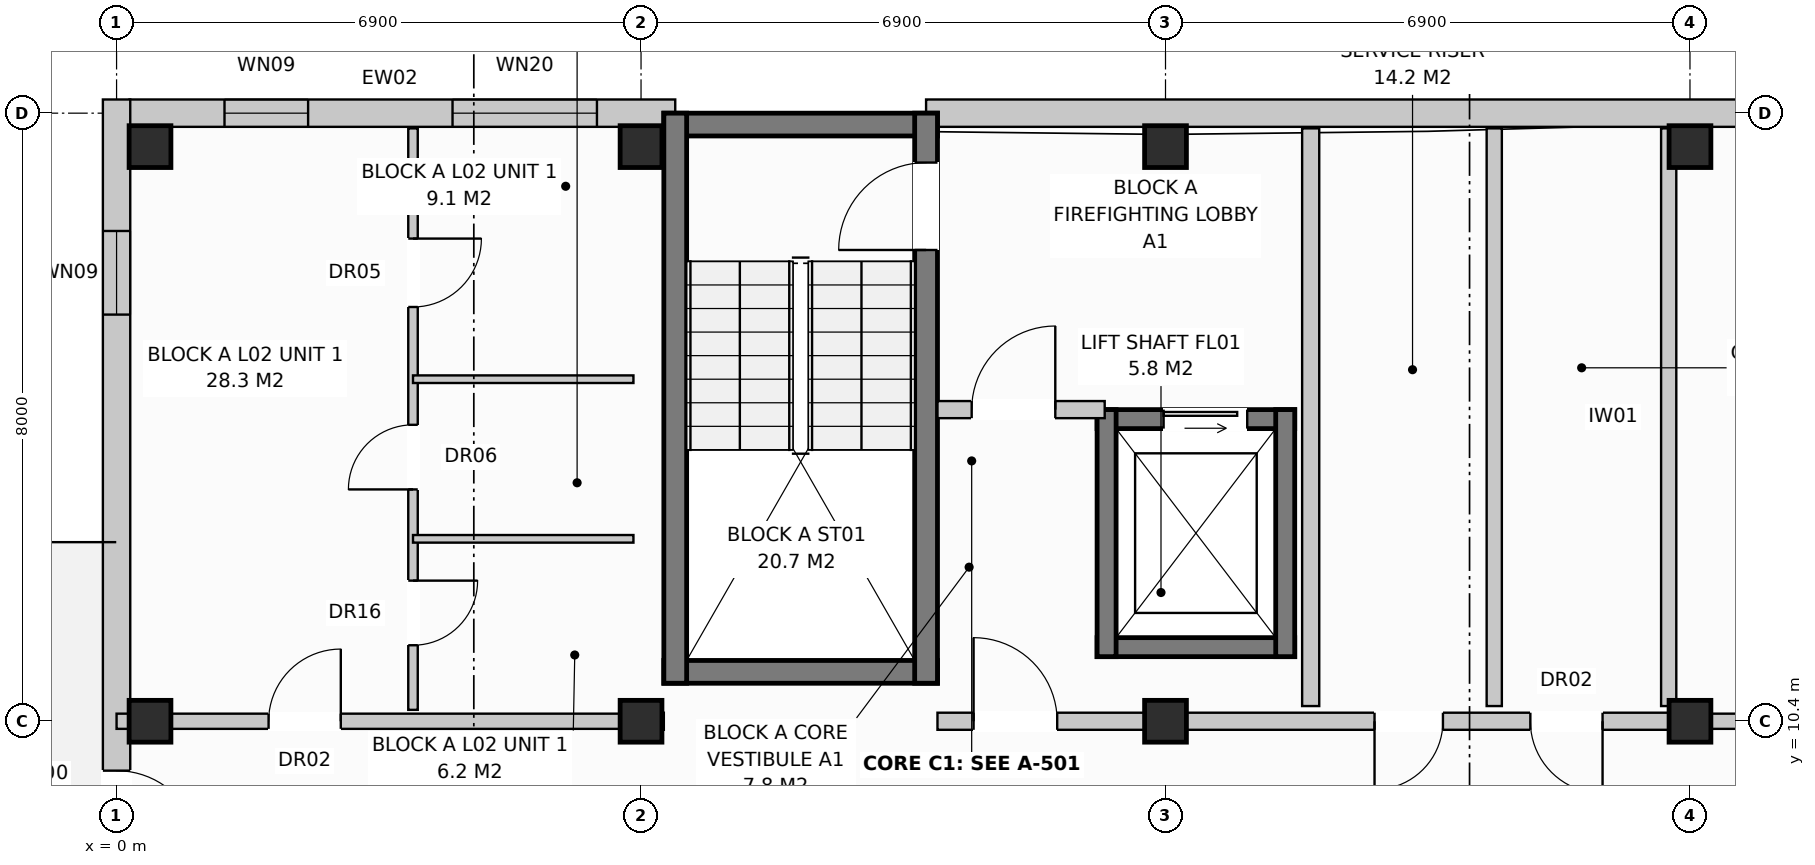
"""IFC4 building model, lengths in metres.
Left out: names, types, materials, properties, quantities, classifications, styles, units other than length and angle.
Written with IfcOpenShell. Run it as: python <this file> out.ifc"""

import sys

from ifc_helpers import new_model, si_unit, direction, frame, frame_2d, origin, origin_with_axes, origin_2d, place, context, subcontext, project, spatial, rectangle, extrude, element, fill, save


model = new_model("IFC4")
c1 = context("Model", 3, precision=1e-05, world=origin(), true_north=direction((0.0, 1.0)))
c2 = subcontext(c1, "Body", "Model", "MODEL_VIEW")
j1 = project(units=[si_unit("LENGTHUNIT", "METRE"), si_unit("PLANEANGLEUNIT", "RADIAN")], contexts=[c1])
p1 = place(None, origin())
s1 = spatial("IfcSite", under=j1, at=p1, CompositionType="ELEMENT")
p2 = place(p1, origin())
s2 = spatial("IfcBuilding", under=s1, at=p2, CompositionType="ELEMENT")
p3 = place(p2, frame((0.0, 0.0, 8.0)))
s3 = spatial("IfcBuildingStorey", under=s2, at=p3, CompositionType="ELEMENT", Elevation=8.0)
for number, where, z_axis, x_axis in (
    (1, (0.44, 10.4, 0.0), (0.0, 0.0, 1.0), (1.0, 0.0, 0.0)),
    (2, (0.44, 17.96, 0.0), (0.0, 0.0, 1.0), (1.0, 0.0, 0.0)),
    (3, (6.9, 10.4, 0.0), (0.0, 0.0, 1.0), (1.0, 0.0, 0.0)),
    (4, (6.9, 17.96, 0.0), (0.0, 0.0, 1.0), (1.0, 0.0, 0.0)),
    (5, (13.8, 10.4, 0.0), (0.0, 0.0, 1.0), (1.0, 0.0, 0.0)),
    (6, (13.8, 17.96, 0.0), (0.0, 0.0, 1.0), (1.0, 0.0, 0.0)),
    (7, (20.7, 10.4, 0.0), (0.0, 0.0, 1.0), (1.0, 0.0, 0.0)),
    (8, (20.7, 17.96, 0.0), (0.0, 0.0, 1.0), (1.0, 0.0, 0.0)),
):
    element("IfcColumn", number, at=place(p3, frame(where, z_axis=z_axis, x_axis=x_axis)), inside=s3, PredefinedType="COLUMN", context=c2, shape_type="SweptSolid", body=[
        extrude(rectangle(XDim=0.55, YDim=0.55, at=origin_2d()), origin(), (0.0, 0.0, 1.0), 3.2),
    ])
p4 = place(p3, frame((0.17, 18.4, 0.0), z_axis=(0.0, 0.0, 1.0), x_axis=(1.0, 0.0, 0.0)))
e9 = element("IfcWall", 9, at=p4, inside=s3, PredefinedType="STANDARD", context=c2, shape_type="SweptSolid", body=[
    extrude(rectangle(XDim=7.18, YDim=0.36, at=frame_2d((3.59, 0.0))), origin(), (0.0, 0.0, 1.0), 2.94),
])
p5 = place(p4, frame((1.25, 0.0, 0.72)))
e10 = element("IfcOpeningElement", 10, at=p5, cuts=e9, PredefinedType="OPENING", context=c2, shape_type="SweptSolid", body=[
    extrude(rectangle(XDim=1.1, YDim=1.5, at=frame_2d((0.55, 0.75))), frame((0.0, 0.192, 0.0), z_axis=(0.0, -1.0, 0.0), x_axis=(1.0, 0.0, 0.0)), (0.0, 0.0, 1.0), 0.384),
])
p6 = place(p4, frame((4.25, 0.0, 0.8)))
e11 = element("IfcOpeningElement", 11, at=p6, cuts=e9, PredefinedType="OPENING", context=c2, shape_type="SweptSolid", body=[
    extrude(rectangle(XDim=1.9, YDim=1.85, at=frame_2d((0.95, 0.925))), frame((0.0, 0.192, 0.0), z_axis=(0.0, -1.0, 0.0), x_axis=(1.0, 0.0, 0.0)), (0.0, 0.0, 1.0), 0.384),
])
p7 = place(p3, frame((10.65, 18.4, 0.0), z_axis=(0.0, 0.0, 1.0), x_axis=(1.0, 0.0, 0.0)))
e12 = element("IfcWall", 12, at=p7, inside=s3, PredefinedType="STANDARD", context=c2, shape_type="SweptSolid", body=[
    extrude(rectangle(XDim=17.4, YDim=0.36, at=frame_2d((8.7, 0.0))), origin(), (0.0, 0.0, 1.0), 2.94),
])
p8 = place(p7, frame((11.831, 0.0, 0.0)))
e13 = element("IfcOpeningElement", 13, at=p8, cuts=e12, PredefinedType="OPENING", context=c2, shape_type="SweptSolid", body=[
    extrude(rectangle(XDim=1.05, YDim=2.12, at=frame_2d((0.525, 1.06))), frame((0.0, 0.192, 0.0), z_axis=(0.0, -1.0, 0.0), x_axis=(1.0, 0.0, 0.0)), (0.0, 0.0, 1.0), 0.384),
])
p9 = place(p7, frame((14.87, 0.0, 0.72)))
e14 = element("IfcOpeningElement", 14, at=p9, cuts=e12, PredefinedType="OPENING", context=c2, shape_type="SweptSolid", body=[
    extrude(rectangle(XDim=1.1, YDim=1.5, at=frame_2d((0.55, 0.75))), frame((0.0, 0.192, 0.0), z_axis=(0.0, -1.0, 0.0), x_axis=(1.0, 0.0, 0.0)), (0.0, 0.0, 1.0), 0.384),
])
p10 = place(p3, frame((0.0, -0.18, 0.0), z_axis=(0.0, 0.0, 1.0), x_axis=(0.0, 1.0, 0.0)))
e15 = element("IfcWall", 15, at=p10, inside=s3, PredefinedType="STANDARD", context=c2, shape_type="SweptSolid", body=[
    extrude(rectangle(XDim=18.76, YDim=0.36, at=frame_2d((9.38, 0.0))), origin(), (0.0, 0.0, 1.0), 2.94),
])
p11 = place(p10, frame((8.83, 0.0, 0.0)))
e16 = element("IfcOpeningElement", 16, at=p11, cuts=e15, PredefinedType="OPENING", context=c2, shape_type="SweptSolid", body=[
    extrude(rectangle(XDim=1.1, YDim=2.1, at=frame_2d((0.55, 1.05))), frame((0.0, 0.192, 0.0), z_axis=(0.0, -1.0, 0.0), x_axis=(1.0, 0.0, 0.0)), (0.0, 0.0, 1.0), 0.384),
])
p12 = place(p10, frame((1.73, 0.0, 0.72)))
e17 = element("IfcOpeningElement", 17, at=p12, cuts=e15, PredefinedType="OPENING", context=c2, shape_type="SweptSolid", body=[
    extrude(rectangle(XDim=1.1, YDim=1.5, at=frame_2d((0.55, 0.75))), frame((0.0, 0.192, 0.0), z_axis=(0.0, -1.0, 0.0), x_axis=(1.0, 0.0, 0.0)), (0.0, 0.0, 1.0), 0.384),
])
p13 = place(p10, frame((15.93, 0.0, 0.72)))
e18 = element("IfcOpeningElement", 18, at=p13, cuts=e15, PredefinedType="OPENING", context=c2, shape_type="SweptSolid", body=[
    extrude(rectangle(XDim=1.1, YDim=1.5, at=frame_2d((0.55, 0.75))), frame((0.0, 0.192, 0.0), z_axis=(0.0, -1.0, 0.0), x_axis=(1.0, 0.0, 0.0)), (0.0, 0.0, 1.0), 0.384),
])
for number, where, z_axis, x_axis in (
    (19, (7.2, 18.25, 0.0), (0.0, 0.0, 1.0), (1.0, 0.0, 0.0)),
    (20, (7.2, 11.05, 0.0), (0.0, 0.0, 1.0), (1.0, 0.0, 0.0)),
):
    element("IfcWall", number, at=place(p3, frame(where, z_axis=z_axis, x_axis=x_axis)), inside=s3, PredefinedType="SHEAR", context=c2, shape_type="SweptSolid", body=[
        extrude(rectangle(XDim=3.6, YDim=0.3, at=frame_2d((1.8, 0.0))), origin(), (0.0, 0.0, 1.0), 2.94),
    ])
p14 = place(p3, frame((7.35, 10.9, 0.0), z_axis=(0.0, 0.0, 1.0), x_axis=(0.0, 1.0, 0.0)))
e21 = element("IfcWall", 21, at=p14, inside=s3, PredefinedType="SHEAR", context=c2, shape_type="SweptSolid", body=[
    extrude(rectangle(XDim=7.5, YDim=0.3, at=frame_2d((3.75, 0.0))), origin(), (0.0, 0.0, 1.0), 2.94),
])
p15 = place(p3, frame((10.65, 10.9, 0.0), z_axis=(0.0, 0.0, 1.0), x_axis=(0.0, 1.0, 0.0)))
e22 = element("IfcWall", 22, at=p15, inside=s3, PredefinedType="SHEAR", context=c2, shape_type="SweptSolid", body=[
    extrude(rectangle(XDim=7.5, YDim=0.3, at=frame_2d((3.75, 0.0))), origin(), (0.0, 0.0, 1.0), 2.94),
])
p16 = place(p15, frame((5.7, 0.0, 0.0)))
e23 = element("IfcOpeningElement", 23, at=p16, cuts=e22, PredefinedType="OPENING", context=c2, shape_type="SweptSolid", body=[
    extrude(rectangle(XDim=1.15, YDim=2.15, at=frame_2d((0.575, 1.075))), frame((0.0, 0.162, 0.0), z_axis=(0.0, -1.0, 0.0), x_axis=(1.0, 0.0, 0.0)), (0.0, 0.0, 1.0), 0.324),
])
p17 = place(p3, frame((12.9, 14.375, 0.0), z_axis=(0.0, 0.0, 1.0), x_axis=(1.0, 0.0, 0.0)))
e24 = element("IfcWall", 24, at=p17, inside=s3, PredefinedType="SHEAR", context=c2, shape_type="SweptSolid", body=[
    extrude(rectangle(XDim=2.6, YDim=0.25, at=frame_2d((1.3, 0.0))), origin(), (0.0, 0.0, 1.0), 2.94),
])
p18 = place(p17, frame((0.875, 0.0, 0.0)))
e25 = element("IfcOpeningElement", 25, at=p18, cuts=e24, PredefinedType="OPENING", context=c2, shape_type="SweptSolid", body=[
    extrude(rectangle(XDim=1.1, YDim=2.1, at=frame_2d((0.55, 1.05))), frame((0.0, 0.137, 0.0), z_axis=(0.0, -1.0, 0.0), x_axis=(1.0, 0.0, 0.0)), (0.0, 0.0, 1.0), 0.274),
])
p19 = place(p3, frame((12.9, 11.375, 0.0), z_axis=(0.0, 0.0, 1.0), x_axis=(1.0, 0.0, 0.0)))
e26 = element("IfcWall", 26, at=p19, inside=s3, PredefinedType="SHEAR", context=c2, shape_type="SweptSolid", body=[
    extrude(rectangle(XDim=2.6, YDim=0.25, at=frame_2d((1.3, 0.0))), origin(), (0.0, 0.0, 1.0), 2.94),
])
for number, where, z_axis, x_axis in (
    (27, (13.025, 11.25, 0.0), (0.0, 0.0, 1.0), (0.0, 1.0, 0.0)),
    (28, (15.375, 11.25, 0.0), (0.0, 0.0, 1.0), (0.0, 1.0, 0.0)),
):
    element("IfcWall", number, at=place(p3, frame(where, z_axis=z_axis, x_axis=x_axis)), inside=s3, PredefinedType="SHEAR", context=c2, shape_type="SweptSolid", body=[
        extrude(rectangle(XDim=3.25, YDim=0.25, at=frame_2d((1.625, 0.0))), origin(), (0.0, 0.0, 1.0), 2.94),
    ])
p20 = place(p3, frame((15.71, 10.6, 0.0), z_axis=(0.0, 0.0, 1.0), x_axis=(0.0, 1.0, 0.0)))
e29 = element("IfcWall", 29, at=p20, inside=s3, PredefinedType="PARTITIONING", context=c2, shape_type="SweptSolid", body=[
    extrude(rectangle(XDim=7.6, YDim=0.225, at=frame_2d((3.8, 0.0))), origin(), (0.0, 0.0, 1.0), 2.59),
])
p21 = place(p3, frame((10.8, 14.5, 0.0), z_axis=(0.0, 0.0, 1.0), x_axis=(1.0, 0.0, 0.0)))
e30 = element("IfcWall", 30, at=p21, inside=s3, PredefinedType="PARTITIONING", context=c2, shape_type="SweptSolid", body=[
    extrude(rectangle(XDim=2.2, YDim=0.225, at=frame_2d((1.1, 0.0))), origin(), (0.0, 0.0, 1.0), 2.94),
])
p22 = place(p21, frame((0.45, 0.0, 0.0)))
e31 = element("IfcOpeningElement", 31, at=p22, cuts=e30, PredefinedType="OPENING", context=c2, shape_type="SweptSolid", body=[
    extrude(rectangle(XDim=1.1, YDim=2.15, at=frame_2d((0.55, 1.075))), frame((0.0, 0.125, 0.0), z_axis=(0.0, -1.0, 0.0), x_axis=(1.0, 0.0, 0.0)), (0.0, 0.0, 1.0), 0.249),
])
p23 = place(p3, frame((6.9, 10.4, 0.0), z_axis=(0.0, 0.0, 1.0), x_axis=(1.0, 0.0, 0.0)))
e32 = element("IfcWall", 32, at=p23, inside=s3, PredefinedType="PARTITIONING", context=c2, shape_type="SweptSolid", body=[
    extrude(rectangle(XDim=0.3, YDim=0.225, at=frame_2d((0.15, 0.0))), origin(), (0.0, 0.0, 1.0), 2.94),
])
for number, where, z_axis, x_axis in (
    (33, (18.125, 10.6, 0.0), (0.0, 0.0, 1.0), (0.0, 1.0, 0.0)),
    (34, (20.42, 10.6, 0.0), (0.0, 0.0, 1.0), (0.0, 1.0, 0.0)),
):
    element("IfcWall", number, at=place(p3, frame(where, z_axis=z_axis, x_axis=x_axis)), inside=s3, PredefinedType="PARTITIONING", context=c2, shape_type="SweptSolid", body=[
        extrude(rectangle(XDim=7.6, YDim=0.2, at=frame_2d((3.8, 0.0))), origin(), (0.0, 0.0, 1.0), 2.94),
    ])
p24 = place(p3, frame((10.8, 10.4, 0.0), z_axis=(0.0, 0.0, 1.0), x_axis=(1.0, 0.0, 0.0)))
e35 = element("IfcWall", 35, at=p24, inside=s3, PredefinedType="PARTITIONING", context=c2, shape_type="SweptSolid", body=[
    extrude(rectangle(XDim=9.9, YDim=0.225, at=frame_2d((4.95, 0.0))), origin(), (0.0, 0.0, 1.0), 2.38),
])
p25 = place(p24, frame((0.475, 0.0, 0.0)))
e36 = element("IfcOpeningElement", 36, at=p25, cuts=e35, PredefinedType="OPENING", context=c2, shape_type="SweptSolid", body=[
    extrude(rectangle(XDim=1.1, YDim=2.15, at=frame_2d((0.55, 1.075))), frame((0.0, 0.125, 0.0), z_axis=(0.0, -1.0, 0.0), x_axis=(1.0, 0.0, 0.0)), (0.0, 0.0, 1.0), 0.249),
])
p26 = place(p24, frame((5.75, 0.0, 0.0)))
e37 = element("IfcOpeningElement", 37, at=p26, cuts=e35, PredefinedType="OPENING", context=c2, shape_type="SweptSolid", body=[
    extrude(rectangle(XDim=0.9, YDim=2.1, at=frame_2d((0.45, 1.05))), frame((0.0, 0.125, 0.0), z_axis=(0.0, -1.0, 0.0), x_axis=(1.0, 0.0, 0.0)), (0.0, 0.0, 1.0), 0.249),
])
p27 = place(p24, frame((7.8, 0.0, 0.0)))
e38 = element("IfcOpeningElement", 38, at=p27, cuts=e35, PredefinedType="OPENING", context=c2, shape_type="SweptSolid", body=[
    extrude(rectangle(XDim=0.95, YDim=2.15, at=frame_2d((0.475, 1.075))), frame((0.0, 0.125, 0.0), z_axis=(0.0, -1.0, 0.0), x_axis=(1.0, 0.0, 0.0)), (0.0, 0.0, 1.0), 0.249),
])
p28 = place(p3, frame((0.0, 10.4, 0.0), z_axis=(0.0, 0.0, 1.0), x_axis=(1.0, 0.0, 0.0)))
e39 = element("IfcWall", 39, at=p28, inside=s3, PredefinedType="PARTITIONING", context=c2, shape_type="SweptSolid", body=[
    extrude(rectangle(XDim=6.9, YDim=0.2, at=frame_2d((3.45, 0.0))), origin(), (0.0, 0.0, 1.0), 2.38),
])
p29 = place(p28, frame((2.0, 0.0, 0.0)))
e40 = element("IfcOpeningElement", 40, at=p29, cuts=e39, PredefinedType="OPENING", context=c2, shape_type="SweptSolid", body=[
    extrude(rectangle(XDim=0.95, YDim=2.15, at=frame_2d((0.475, 1.075))), frame((0.0, 0.112, 0.0), z_axis=(0.0, -1.0, 0.0), x_axis=(1.0, 0.0, 0.0)), (0.0, 0.0, 1.0), 0.224),
])
p30 = place(p3, frame((3.9, 10.55, 0.0), z_axis=(0.0, 0.0, 1.0), x_axis=(0.0, 1.0, 0.0)))
e41 = element("IfcWall", 41, at=p30, inside=s3, PredefinedType="PARTITIONING", context=c2, shape_type="SweptSolid", body=[
    extrude(rectangle(XDim=7.65, YDim=0.125, at=frame_2d((3.825, 0.0))), origin(), (0.0, 0.0, 1.0), 2.94),
])
p31 = place(p30, frame((0.85, 0.0, 0.0)))
e42 = element("IfcOpeningElement", 42, at=p31, cuts=e41, PredefinedType="OPENING", context=c2, shape_type="SweptSolid", body=[
    extrude(rectangle(XDim=0.85, YDim=2.1, at=frame_2d((0.425, 1.05))), frame((0.0, 0.074, 0.0), z_axis=(0.0, -1.0, 0.0), x_axis=(1.0, 0.0, 0.0)), (0.0, 0.0, 1.0), 0.149),
])
p32 = place(p30, frame((2.9, 0.0, 0.0)))
e43 = element("IfcOpeningElement", 43, at=p32, cuts=e41, PredefinedType="OPENING", context=c2, shape_type="SweptSolid", body=[
    extrude(rectangle(XDim=0.85, YDim=2.05, at=frame_2d((0.425, 1.025))), frame((0.0, 0.074, 0.0), z_axis=(0.0, -1.0, 0.0), x_axis=(1.0, 0.0, 0.0)), (0.0, 0.0, 1.0), 0.149),
])
p33 = place(p30, frame((5.3, 0.0, 0.0)))
e44 = element("IfcOpeningElement", 44, at=p33, cuts=e41, PredefinedType="OPENING", context=c2, shape_type="SweptSolid", body=[
    extrude(rectangle(XDim=0.9, YDim=2.1, at=frame_2d((0.45, 1.05))), frame((0.0, 0.074, 0.0), z_axis=(0.0, -1.0, 0.0), x_axis=(1.0, 0.0, 0.0)), (0.0, 0.0, 1.0), 0.149),
])
for number, where, z_axis, x_axis in (
    (45, (3.9, 12.8, 0.0), (0.0, 0.0, 1.0), (1.0, 0.0, 0.0)),
    (46, (3.9, 14.9, 0.0), (0.0, 0.0, 1.0), (1.0, 0.0, 0.0)),
):
    element("IfcWall", number, at=place(p3, frame(where, z_axis=z_axis, x_axis=x_axis)), inside=s3, PredefinedType="PARTITIONING", context=c2, shape_type="SweptSolid", body=[
        extrude(rectangle(XDim=2.9, YDim=0.1, at=frame_2d((1.45, 0.0))), origin(), (0.0, 0.0, 1.0), 2.94),
    ])
p34 = place(p3, frame((20.7, 10.4, 0.0), z_axis=(0.0, 0.0, 1.0), x_axis=(1.0, 0.0, 0.0)))
e47 = element("IfcWall", 47, at=p34, inside=s3, PredefinedType="PARTITIONING", context=c2, shape_type="SweptSolid", body=[
    extrude(rectangle(XDim=6.9, YDim=0.2, at=frame_2d((3.45, 0.0))), origin(), (0.0, 0.0, 1.0), 2.38),
])
p35 = place(p34, frame((2.0, 0.0, 0.0)))
e48 = element("IfcOpeningElement", 48, at=p35, cuts=e47, PredefinedType="OPENING", context=c2, shape_type="SweptSolid", body=[
    extrude(rectangle(XDim=0.95, YDim=2.15, at=frame_2d((0.475, 1.075))), frame((0.0, 0.112, 0.0), z_axis=(0.0, -1.0, 0.0), x_axis=(1.0, 0.0, 0.0)), (0.0, 0.0, 1.0), 0.224),
])
p36 = place(p5, origin_with_axes())
e49 = element("IfcWindow", 49, at=p36, inside=s3, PartitioningType="SINGLE_PANEL", PredefinedType="WINDOW", context=c2, shape_type="SweptSolid", body=[
    extrude(rectangle(XDim=1.1, YDim=1.5, at=frame_2d((0.55, 0.75))), frame((0.0, 0.03, 0.0), z_axis=(0.0, -1.0, 0.0), x_axis=(1.0, 0.0, 0.0)), (0.0, 0.0, 1.0), 0.06),
])
fill(e10, e49)
p37 = place(p6, origin_with_axes())
e50 = element("IfcWindow", 50, at=p37, inside=s3, PartitioningType="SINGLE_PANEL", PredefinedType="WINDOW", context=c2, shape_type="SweptSolid", body=[
    extrude(rectangle(XDim=1.9, YDim=1.85, at=frame_2d((0.95, 0.925))), frame((0.0, 0.03, 0.0), z_axis=(0.0, -1.0, 0.0), x_axis=(1.0, 0.0, 0.0)), (0.0, 0.0, 1.0), 0.06),
])
fill(e11, e50)
p38 = place(p11, frame((1.1, 0.0, 0.0), z_axis=(0.0, 0.0, 1.0), x_axis=(-1.0, 0.0, 0.0)))
e51 = element("IfcDoor", 51, at=p38, inside=s3, OperationType="SINGLE_SWING_LEFT", PredefinedType="DOOR", context=c2, shape_type="SweptSolid", body=[
    extrude(rectangle(XDim=1.1, YDim=2.1, at=frame_2d((0.55, 1.05))), frame((0.0, 0.025, 0.0), z_axis=(0.0, -1.0, 0.0), x_axis=(1.0, 0.0, 0.0)), (0.0, 0.0, 1.0), 0.05),
])
fill(e16, e51)
p39 = place(p13, origin_with_axes())
e52 = element("IfcWindow", 52, at=p39, inside=s3, PartitioningType="SINGLE_PANEL", PredefinedType="WINDOW", context=c2, shape_type="SweptSolid", body=[
    extrude(rectangle(XDim=1.1, YDim=1.5, at=frame_2d((0.55, 0.75))), frame((0.0, 0.03, 0.0), z_axis=(0.0, -1.0, 0.0), x_axis=(1.0, 0.0, 0.0)), (0.0, 0.0, 1.0), 0.06),
])
fill(e18, e52)
p40 = place(p16, origin_with_axes())
e53 = element("IfcDoor", 53, at=p40, inside=s3, OperationType="SINGLE_SWING_LEFT", PredefinedType="DOOR", context=c2, shape_type="SweptSolid", body=[
    extrude(rectangle(XDim=1.15, YDim=2.15, at=frame_2d((0.575, 1.075))), frame((0.0, 0.025, 0.0), z_axis=(0.0, -1.0, 0.0), x_axis=(1.0, 0.0, 0.0)), (0.0, 0.0, 1.0), 0.05),
])
fill(e23, e53)
p41 = place(p18, origin_with_axes())
e54 = element("IfcDoor", 54, at=p41, inside=s3, OperationType="SLIDING_TO_LEFT", PredefinedType="DOOR", context=c2, shape_type="SweptSolid", body=[
    extrude(rectangle(XDim=1.1, YDim=2.1, at=frame_2d((0.55, 1.05))), frame((0.0, 0.025, 0.0), z_axis=(0.0, -1.0, 0.0), x_axis=(1.0, 0.0, 0.0)), (0.0, 0.0, 1.0), 0.05),
])
fill(e25, e54)
p42 = place(p22, origin_with_axes())
e55 = element("IfcDoor", 55, at=p42, inside=s3, OperationType="SINGLE_SWING_RIGHT", PredefinedType="DOOR", context=c2, shape_type="SweptSolid", body=[
    extrude(rectangle(XDim=1.1, YDim=2.15, at=frame_2d((0.55, 1.075))), frame((0.0, 0.025, 0.0), z_axis=(0.0, -1.0, 0.0), x_axis=(1.0, 0.0, 0.0)), (0.0, 0.0, 1.0), 0.05),
])
fill(e31, e55)
p43 = place(p25, origin_with_axes())
e56 = element("IfcDoor", 56, at=p43, inside=s3, OperationType="SINGLE_SWING_LEFT", PredefinedType="DOOR", context=c2, shape_type="SweptSolid", body=[
    extrude(rectangle(XDim=1.1, YDim=2.15, at=frame_2d((0.55, 1.075))), frame((0.0, 0.025, 0.0), z_axis=(0.0, -1.0, 0.0), x_axis=(1.0, 0.0, 0.0)), (0.0, 0.0, 1.0), 0.05),
])
fill(e36, e56)
p44 = place(p26, frame((0.9, 0.0, 0.0), z_axis=(0.0, 0.0, 1.0), x_axis=(-1.0, 0.0, 0.0)))
e57 = element("IfcDoor", 57, at=p44, inside=s3, OperationType="SINGLE_SWING_LEFT", PredefinedType="DOOR", context=c2, shape_type="SweptSolid", body=[
    extrude(rectangle(XDim=0.9, YDim=2.1, at=frame_2d((0.45, 1.05))), frame((0.0, 0.025, 0.0), z_axis=(0.0, -1.0, 0.0), x_axis=(1.0, 0.0, 0.0)), (0.0, 0.0, 1.0), 0.05),
])
fill(e37, e57)
p45 = place(p27, frame((0.95, 0.0, 0.0), z_axis=(0.0, 0.0, 1.0), x_axis=(-1.0, 0.0, 0.0)))
e58 = element("IfcDoor", 58, at=p45, inside=s3, OperationType="SINGLE_SWING_RIGHT", PredefinedType="DOOR", context=c2, shape_type="SweptSolid", body=[
    extrude(rectangle(XDim=0.95, YDim=2.15, at=frame_2d((0.475, 1.075))), frame((0.0, 0.025, 0.0), z_axis=(0.0, -1.0, 0.0), x_axis=(1.0, 0.0, 0.0)), (0.0, 0.0, 1.0), 0.05),
])
fill(e38, e58)
p46 = place(p29, origin_with_axes())
e59 = element("IfcDoor", 59, at=p46, inside=s3, OperationType="SINGLE_SWING_RIGHT", PredefinedType="DOOR", context=c2, shape_type="SweptSolid", body=[
    extrude(rectangle(XDim=0.95, YDim=2.15, at=frame_2d((0.475, 1.075))), frame((0.0, 0.025, 0.0), z_axis=(0.0, -1.0, 0.0), x_axis=(1.0, 0.0, 0.0)), (0.0, 0.0, 1.0), 0.05),
])
fill(e40, e59)
p47 = place(p31, frame((0.85, 0.0, 0.0), z_axis=(0.0, 0.0, 1.0), x_axis=(-1.0, 0.0, 0.0)))
e60 = element("IfcDoor", 60, at=p47, inside=s3, OperationType="SINGLE_SWING_RIGHT", PredefinedType="DOOR", context=c2, shape_type="SweptSolid", body=[
    extrude(rectangle(XDim=0.85, YDim=2.1, at=frame_2d((0.425, 1.05))), frame((0.0, 0.025, 0.0), z_axis=(0.0, -1.0, 0.0), x_axis=(1.0, 0.0, 0.0)), (0.0, 0.0, 1.0), 0.05),
])
fill(e42, e60)
p48 = place(p32, origin_with_axes())
e61 = element("IfcDoor", 61, at=p48, inside=s3, OperationType="SINGLE_SWING_LEFT", PredefinedType="DOOR", context=c2, shape_type="SweptSolid", body=[
    extrude(rectangle(XDim=0.85, YDim=2.05, at=frame_2d((0.425, 1.025))), frame((0.0, 0.025, 0.0), z_axis=(0.0, -1.0, 0.0), x_axis=(1.0, 0.0, 0.0)), (0.0, 0.0, 1.0), 0.05),
])
fill(e43, e61)
p49 = place(p33, frame((0.9, 0.0, 0.0), z_axis=(0.0, 0.0, 1.0), x_axis=(-1.0, 0.0, 0.0)))
e62 = element("IfcDoor", 62, at=p49, inside=s3, OperationType="SINGLE_SWING_RIGHT", PredefinedType="DOOR", context=c2, shape_type="SweptSolid", body=[
    extrude(rectangle(XDim=0.9, YDim=2.1, at=frame_2d((0.45, 1.05))), frame((0.0, 0.025, 0.0), z_axis=(0.0, -1.0, 0.0), x_axis=(1.0, 0.0, 0.0)), (0.0, 0.0, 1.0), 0.05),
])
fill(e44, e62)
save(model, sys.argv[1])
